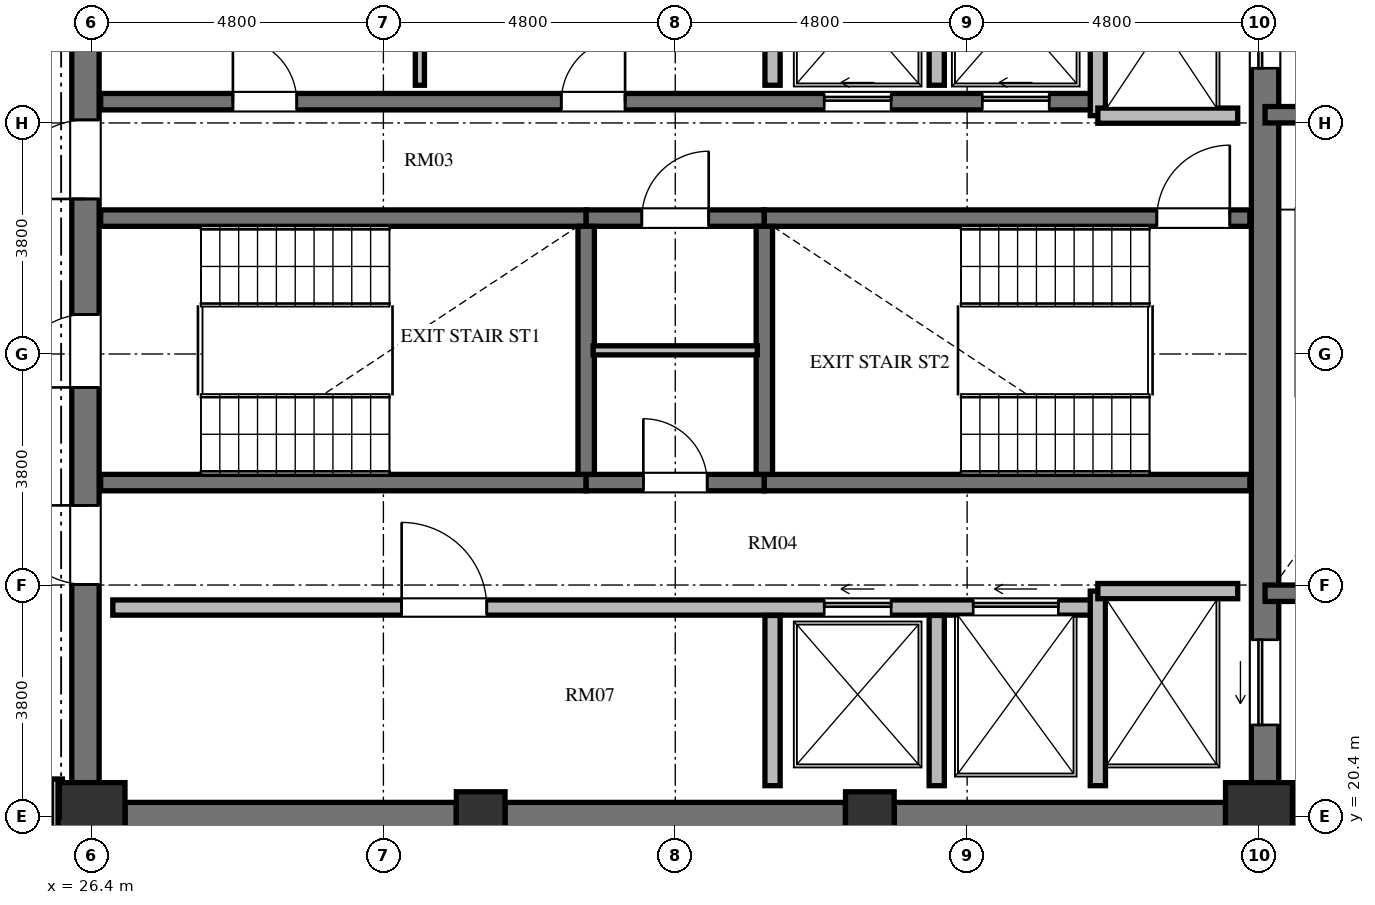
"""IFC4 building model, lengths in metres.
Left out: names, types, materials, properties, quantities, classifications, styles, units other than length and angle.
Written with IfcOpenShell. Run it as: python <this file> out.ifc"""

import sys

from ifc_helpers import new_model, si_unit, direction, frame, frame_2d, origin, origin_2d, place, context, subcontext, project, spatial, rectangle, extrude, element, fill, save


model = new_model("IFC4")
c1 = context("Model", 3, precision=1e-05, world=origin(), true_north=direction((0.0, 1.0)))
c2 = subcontext(c1, "Body", "Model", "MODEL_VIEW")
j1 = project(units=[si_unit("LENGTHUNIT", "METRE"), si_unit("PLANEANGLEUNIT", "RADIAN")], contexts=[c1])
p1 = place(None, origin())
s1 = spatial("IfcSite", under=j1, at=p1, CompositionType="ELEMENT")
p2 = place(p1, origin())
s2 = spatial("IfcBuilding", under=s1, at=p2, CompositionType="ELEMENT")
p3 = place(p2, frame((0.0, 0.0, 251.376)))
s3 = spatial("IfcBuildingStorey", under=s2, at=p3, CompositionType="ELEMENT", Elevation=251.376)
p4 = place(p3, frame((26.4, 20.4, 0.0), z_axis=(0.0, 0.0, 1.0), x_axis=(1.0, 0.0, 0.0)))
e1 = element("IfcColumn", 1, at=p4, inside=s3, PredefinedType="COLUMN", context=c2, shape_type="SweptSolid", body=[
    extrude(rectangle(XDim=1.1, YDim=1.1, at=origin_2d()), origin(), (0.0, 0.0, 1.0), 3.648),
])
for number, where, z_axis, x_axis in (
    (2, (32.8, 20.4, 0.0), (0.0, 0.0, 1.0), (1.0, 0.0, 0.0)),
    (3, (39.2, 20.4, 0.0), (0.0, 0.0, 1.0), (1.0, 0.0, 0.0)),
):
    element("IfcColumn", number, at=place(p3, frame(where, z_axis=z_axis, x_axis=x_axis)), inside=s3, PredefinedType="COLUMN", context=c2, shape_type="SweptSolid", body=[
        extrude(rectangle(XDim=0.8, YDim=0.8, at=origin_2d()), origin(), (0.0, 0.0, 1.0), 3.648),
    ])
p5 = place(p3, frame((45.6, 20.4, 0.0), z_axis=(0.0, 0.0, 1.0), x_axis=(1.0, 0.0, 0.0)))
e4 = element("IfcColumn", 4, at=p5, inside=s3, PredefinedType="COLUMN", context=c2, shape_type="SweptSolid", body=[
    extrude(rectangle(XDim=1.1, YDim=1.1, at=origin_2d()), origin(), (0.0, 0.0, 1.0), 3.648),
])
p6 = place(p3, frame((26.3, 20.95, 0.0), z_axis=(0.0, 0.0, 1.0), x_axis=(0.0, 1.0, 0.0)))
e5 = element("IfcWall", 5, at=p6, inside=s3, PredefinedType="SHEAR", context=c2, shape_type="SweptSolid", body=[
    extrude(rectangle(XDim=14.1, YDim=0.45, at=frame_2d((7.05, 0.0))), origin(), (0.0, 0.0, 1.0), 3.648),
])
p7 = place(p6, frame((6.5, 0.0, 0.0)))
e6 = element("IfcOpeningElement", 6, at=p7, cuts=e5, PredefinedType="OPENING", context=c2, shape_type="SweptSolid", body=[
    extrude(rectangle(XDim=1.2, YDim=2.15, at=frame_2d((0.6, 1.075))), frame((0.0, 0.235, 0.0), z_axis=(0.0, -1.0, 0.0), x_axis=(1.0, 0.0, 0.0)), (0.0, 0.0, 1.0), 0.47),
])
p8 = place(p6, frame((9.6, 0.0, 0.0)))
e7 = element("IfcOpeningElement", 7, at=p8, cuts=e5, PredefinedType="OPENING", context=c2, shape_type="SweptSolid", body=[
    extrude(rectangle(XDim=1.3, YDim=2.2, at=frame_2d((0.65, 1.1))), frame((0.0, 0.235, 0.0), z_axis=(0.0, -1.0, 0.0), x_axis=(1.0, 0.0, 0.0)), (0.0, 0.0, 1.0), 0.47),
])
p9 = place(p6, frame((3.26, 0.0, 0.0)))
e8 = element("IfcOpeningElement", 8, at=p9, cuts=e5, PredefinedType="OPENING", context=c2, shape_type="SweptSolid", body=[
    extrude(rectangle(XDim=1.3, YDim=2.2, at=frame_2d((0.65, 1.1))), frame((0.0, 0.235, 0.0), z_axis=(0.0, -1.0, 0.0), x_axis=(1.0, 0.0, 0.0)), (0.0, 0.0, 1.0), 0.47),
])
p10 = place(p3, frame((45.7, 20.95, 0.0), z_axis=(0.0, 0.0, 1.0), x_axis=(0.0, 1.0, 0.0)))
e9 = element("IfcWall", 9, at=p10, inside=s3, PredefinedType="SHEAR", context=c2, shape_type="SweptSolid", body=[
    extrude(rectangle(XDim=14.1, YDim=0.45, at=frame_2d((7.05, 0.0))), origin(), (0.0, 0.0, 1.0), 3.648),
])
p11 = place(p10, frame((11.75, 0.0, 0.0)))
e10 = element("IfcOpeningElement", 10, at=p11, cuts=e9, PredefinedType="OPENING", context=c2, shape_type="SweptSolid", body=[
    extrude(rectangle(XDim=1.4, YDim=2.3, at=frame_2d((0.7, 1.15))), frame((0.0, 0.235, 0.0), z_axis=(0.0, -1.0, 0.0), x_axis=(1.0, 0.0, 0.0)), (0.0, 0.0, 1.0), 0.47),
])
p12 = place(p10, frame((0.95, 0.0, 0.0)))
e11 = element("IfcOpeningElement", 11, at=p12, cuts=e9, PredefinedType="OPENING", context=c2, shape_type="SweptSolid", body=[
    extrude(rectangle(XDim=1.4, YDim=2.3, at=frame_2d((0.7, 1.15))), frame((0.0, 0.235, 0.0), z_axis=(0.0, -1.0, 0.0), x_axis=(1.0, 0.0, 0.0)), (0.0, 0.0, 1.0), 0.47),
])
p13 = place(p3, frame((26.95, 20.4, 0.0), z_axis=(0.0, 0.0, 1.0), x_axis=(1.0, 0.0, 0.0)))
e12 = element("IfcWall", 12, at=p13, inside=s3, PredefinedType="SHEAR", context=c2, shape_type="SweptSolid", body=[
    extrude(rectangle(XDim=5.45, YDim=0.45, at=frame_2d((2.725, 0.0))), origin(), (0.0, 0.0, 1.0), 3.648),
])
p14 = place(p3, frame((33.2, 20.4, 0.0), z_axis=(0.0, 0.0, 1.0), x_axis=(1.0, 0.0, 0.0)))
e13 = element("IfcWall", 13, at=p14, inside=s3, PredefinedType="SHEAR", context=c2, shape_type="SweptSolid", body=[
    extrude(rectangle(XDim=5.6, YDim=0.45, at=frame_2d((2.8, 0.0))), origin(), (0.0, 0.0, 1.0), 3.648),
])
p15 = place(p3, frame((39.6, 20.4, 0.0), z_axis=(0.0, 0.0, 1.0), x_axis=(1.0, 0.0, 0.0)))
e14 = element("IfcWall", 14, at=p15, inside=s3, PredefinedType="SHEAR", context=c2, shape_type="SweptSolid", body=[
    extrude(rectangle(XDim=5.45, YDim=0.45, at=frame_2d((2.725, 0.0))), origin(), (0.0, 0.0, 1.0), 3.648),
])
p16 = place(p3, frame((26.55, 30.235, 0.0), z_axis=(0.0, 0.0, 1.0), x_axis=(1.0, 0.0, 0.0)))
e15 = element("IfcWall", 15, at=p16, inside=s3, PredefinedType="SHEAR", context=c2, shape_type="SweptSolid", body=[
    extrude(rectangle(XDim=7.985, YDim=0.27, at=frame_2d((3.992, 0.0))), origin(), (0.0, 0.0, 1.0), 3.648),
])
p17 = place(p3, frame((34.535, 30.235, 0.0), z_axis=(0.0, 0.0, 1.0), x_axis=(1.0, 0.0, 0.0)))
e16 = element("IfcWall", 16, at=p17, inside=s3, PredefinedType="SHEAR", context=c2, shape_type="SweptSolid", body=[
    extrude(rectangle(XDim=2.93, YDim=0.27, at=frame_2d((1.465, 0.0))), origin(), (0.0, 0.0, 1.0), 3.648),
])
p18 = place(p17, frame((0.915, 0.0, 0.0)))
e17 = element("IfcOpeningElement", 17, at=p18, cuts=e16, PredefinedType="OPENING", context=c2, shape_type="SweptSolid", body=[
    extrude(rectangle(XDim=1.1, YDim=2.15, at=frame_2d((0.55, 1.075))), frame((0.0, 0.145, 0.0), z_axis=(0.0, -1.0, 0.0), x_axis=(1.0, 0.0, 0.0)), (0.0, 0.0, 1.0), 0.29),
])
p19 = place(p3, frame((37.465, 30.235, 0.0), z_axis=(0.0, 0.0, 1.0), x_axis=(1.0, 0.0, 0.0)))
e18 = element("IfcWall", 18, at=p19, inside=s3, PredefinedType="SHEAR", context=c2, shape_type="SweptSolid", body=[
    extrude(rectangle(XDim=7.985, YDim=0.27, at=frame_2d((3.992, 0.0))), origin(), (0.0, 0.0, 1.0), 3.648),
])
p20 = place(p19, frame((6.455, 0.0, 0.0)))
e19 = element("IfcOpeningElement", 19, at=p20, cuts=e18, PredefinedType="OPENING", context=c2, shape_type="SweptSolid", body=[
    extrude(rectangle(XDim=1.2, YDim=2.15, at=frame_2d((0.6, 1.075))), frame((0.0, 0.145, 0.0), z_axis=(0.0, -1.0, 0.0), x_axis=(1.0, 0.0, 0.0)), (0.0, 0.0, 1.0), 0.29),
])
p21 = place(p3, frame((26.55, 25.885, 0.0), z_axis=(0.0, 0.0, 1.0), x_axis=(1.0, 0.0, 0.0)))
e20 = element("IfcWall", 20, at=p21, inside=s3, PredefinedType="SHEAR", context=c2, shape_type="SweptSolid", body=[
    extrude(rectangle(XDim=7.985, YDim=0.27, at=frame_2d((3.992, 0.0))), origin(), (0.0, 0.0, 1.0), 3.648),
])
p22 = place(p3, frame((34.535, 25.885, 0.0), z_axis=(0.0, 0.0, 1.0), x_axis=(1.0, 0.0, 0.0)))
e21 = element("IfcWall", 21, at=p22, inside=s3, PredefinedType="SHEAR", context=c2, shape_type="SweptSolid", body=[
    extrude(rectangle(XDim=2.93, YDim=0.27, at=frame_2d((1.465, 0.0))), origin(), (0.0, 0.0, 1.0), 3.648),
])
p23 = place(p22, frame((0.94, 0.0, 0.0)))
e22 = element("IfcOpeningElement", 22, at=p23, cuts=e21, PredefinedType="OPENING", context=c2, shape_type="SweptSolid", body=[
    extrude(rectangle(XDim=1.05, YDim=2.15, at=frame_2d((0.525, 1.075))), frame((0.0, 0.145, 0.0), z_axis=(0.0, -1.0, 0.0), x_axis=(1.0, 0.0, 0.0)), (0.0, 0.0, 1.0), 0.29),
])
p24 = place(p3, frame((37.465, 25.885, 0.0), z_axis=(0.0, 0.0, 1.0), x_axis=(1.0, 0.0, 0.0)))
e23 = element("IfcWall", 23, at=p24, inside=s3, PredefinedType="SHEAR", context=c2, shape_type="SweptSolid", body=[
    extrude(rectangle(XDim=7.985, YDim=0.27, at=frame_2d((3.992, 0.0))), origin(), (0.0, 0.0, 1.0), 3.648),
])
for number, where, z_axis, x_axis in (
    (24, (34.535, 26.02, 0.0), (0.0, 0.0, 1.0), (0.0, 1.0, 0.0)),
    (25, (37.465, 26.02, 0.0), (0.0, 0.0, 1.0), (0.0, 1.0, 0.0)),
):
    element("IfcWall", number, at=place(p3, frame(where, z_axis=z_axis, x_axis=x_axis)), inside=s3, PredefinedType="SHEAR", context=c2, shape_type="SweptSolid", body=[
        extrude(rectangle(XDim=4.08, YDim=0.27, at=frame_2d((2.04, 0.0))), origin(), (0.0, 0.0, 1.0), 3.648),
    ])
p25 = place(p3, frame((34.65, 28.06, 0.0), z_axis=(0.0, 0.0, 1.0), x_axis=(1.0, 0.0, 0.0)))
e26 = element("IfcWall", 26, at=p25, inside=s3, PredefinedType="PARTITIONING", context=c2, shape_type="SweptSolid", body=[
    extrude(rectangle(XDim=2.7, YDim=0.15, at=frame_2d((1.35, 0.0))), origin(), (0.0, 0.0, 1.0), 3.448),
])
p26 = place(p3, frame((26.55, 32.15, 0.0), z_axis=(0.0, 0.0, 1.0), x_axis=(1.0, 0.0, 0.0)))
e27 = element("IfcWall", 27, at=p26, inside=s3, PredefinedType="SHEAR", context=c2, shape_type="SweptSolid", body=[
    extrude(rectangle(XDim=16.4, YDim=0.27, at=frame_2d((8.2, 0.0))), origin(), (0.0, 0.0, 1.0), 3.648),
])
p27 = place(p26, frame((2.175, 0.0, 0.0)))
e28 = element("IfcOpeningElement", 28, at=p27, cuts=e27, PredefinedType="OPENING", context=c2, shape_type="SweptSolid", body=[
    extrude(rectangle(XDim=1.05, YDim=2.15, at=frame_2d((0.525, 1.075))), frame((0.0, 0.145, 0.0), z_axis=(0.0, -1.0, 0.0), x_axis=(1.0, 0.0, 0.0)), (0.0, 0.0, 1.0), 0.29),
])
p28 = place(p26, frame((7.575, 0.0, 0.0)))
e29 = element("IfcOpeningElement", 29, at=p28, cuts=e27, PredefinedType="OPENING", context=c2, shape_type="SweptSolid", body=[
    extrude(rectangle(XDim=1.05, YDim=2.15, at=frame_2d((0.525, 1.075))), frame((0.0, 0.145, 0.0), z_axis=(0.0, -1.0, 0.0), x_axis=(1.0, 0.0, 0.0)), (0.0, 0.0, 1.0), 0.29),
])
p29 = place(p26, frame((11.9, 0.0, 0.0)))
e30 = element("IfcOpeningElement", 30, at=p29, cuts=e27, PredefinedType="OPENING", context=c2, shape_type="SweptSolid", body=[
    extrude(rectangle(XDim=1.1, YDim=2.2, at=frame_2d((0.55, 1.1))), frame((0.0, 0.145, 0.0), z_axis=(0.0, -1.0, 0.0), x_axis=(1.0, 0.0, 0.0)), (0.0, 0.0, 1.0), 0.29),
])
p30 = place(p26, frame((14.5, 0.0, 0.0)))
e31 = element("IfcOpeningElement", 31, at=p30, cuts=e27, PredefinedType="OPENING", context=c2, shape_type="SweptSolid", body=[
    extrude(rectangle(XDim=1.1, YDim=2.2, at=frame_2d((0.55, 1.1))), frame((0.0, 0.145, 0.0), z_axis=(0.0, -1.0, 0.0), x_axis=(1.0, 0.0, 0.0)), (0.0, 0.0, 1.0), 0.29),
])
p31 = place(p3, frame((26.75, 23.83, 0.0), z_axis=(0.0, 0.0, 1.0), x_axis=(1.0, 0.0, 0.0)))
e32 = element("IfcWall", 32, at=p31, inside=s3, PredefinedType="SOLIDWALL", context=c2, shape_type="SweptSolid", body=[
    extrude(rectangle(XDim=16.2, YDim=0.25, at=frame_2d((8.1, 0.0))), origin(), (0.0, 0.0, 1.0), 3.448),
])
p32 = place(p31, frame((4.75, 0.0, 0.0)))
e33 = element("IfcOpeningElement", 33, at=p32, cuts=e32, PredefinedType="OPENING", context=c2, shape_type="SweptSolid", body=[
    extrude(rectangle(XDim=1.4, YDim=2.2, at=frame_2d((0.7, 1.1))), frame((0.0, 0.135, 0.0), z_axis=(0.0, -1.0, 0.0), x_axis=(1.0, 0.0, 0.0)), (0.0, 0.0, 1.0), 0.27),
])
p33 = place(p31, frame((11.7, 0.0, 0.0)))
e34 = element("IfcOpeningElement", 34, at=p33, cuts=e32, PredefinedType="OPENING", context=c2, shape_type="SweptSolid", body=[
    extrude(rectangle(XDim=1.1, YDim=2.2, at=frame_2d((0.55, 1.1))), frame((0.0, 0.135, 0.0), z_axis=(0.0, -1.0, 0.0), x_axis=(1.0, 0.0, 0.0)), (0.0, 0.0, 1.0), 0.27),
])
p34 = place(p31, frame((14.15, 0.0, 0.0)))
e35 = element("IfcOpeningElement", 35, at=p34, cuts=e32, PredefinedType="OPENING", context=c2, shape_type="SweptSolid", body=[
    extrude(rectangle(XDim=1.4, YDim=2.3, at=frame_2d((0.7, 1.15))), frame((0.0, 0.135, 0.0), z_axis=(0.0, -1.0, 0.0), x_axis=(1.0, 0.0, 0.0)), (0.0, 0.0, 1.0), 0.27),
])
p35 = place(p3, frame((42.95, 31.92, 0.0), z_axis=(0.0, 0.0, 1.0), x_axis=(0.0, 1.0, 0.0)))
e36 = element("IfcWall", 36, at=p35, inside=s3, PredefinedType="SOLIDWALL", context=c2, shape_type="SweptSolid", body=[
    extrude(rectangle(XDim=3.18, YDim=0.25, at=frame_2d((1.59, 0.0))), origin(), (0.0, 0.0, 1.0), 3.448),
])
p36 = place(p3, frame((42.95, 31.92, 0.0), z_axis=(0.0, 0.0, 1.0), x_axis=(1.0, 0.0, 0.0)))
e37 = element("IfcWall", 37, at=p36, inside=s3, PredefinedType="SOLIDWALL", context=c2, shape_type="SweptSolid", body=[
    extrude(rectangle(XDim=2.3, YDim=0.25, at=frame_2d((1.15, 0.0))), origin(), (0.0, 0.0, 1.0), 3.448),
])
p37 = place(p3, frame((42.95, 20.9, 0.0), z_axis=(0.0, 0.0, 1.0), x_axis=(0.0, 1.0, 0.0)))
e38 = element("IfcWall", 38, at=p37, inside=s3, PredefinedType="SOLIDWALL", context=c2, shape_type="SweptSolid", body=[
    extrude(rectangle(XDim=3.2, YDim=0.25, at=frame_2d((1.6, 0.0))), origin(), (0.0, 0.0, 1.0), 3.448),
])
p38 = place(p3, frame((42.95, 24.1, 0.0), z_axis=(0.0, 0.0, 1.0), x_axis=(1.0, 0.0, 0.0)))
e39 = element("IfcWall", 39, at=p38, inside=s3, PredefinedType="SOLIDWALL", context=c2, shape_type="SweptSolid", body=[
    extrude(rectangle(XDim=2.3, YDim=0.25, at=frame_2d((1.15, 0.0))), origin(), (0.0, 0.0, 1.0), 3.448),
])
p39 = place(p3, frame((37.6, 32.42, 0.0), z_axis=(0.0, 0.0, 1.0), x_axis=(0.0, 1.0, 0.0)))
e40 = element("IfcWall", 40, at=p39, inside=s3, PredefinedType="SOLIDWALL", context=c2, shape_type="SweptSolid", body=[
    extrude(rectangle(XDim=2.68, YDim=0.25, at=frame_2d((1.34, 0.0))), origin(), (0.0, 0.0, 1.0), 3.448),
])
p40 = place(p3, frame((37.6, 20.9, 0.0), z_axis=(0.0, 0.0, 1.0), x_axis=(0.0, 1.0, 0.0)))
e41 = element("IfcWall", 41, at=p40, inside=s3, PredefinedType="SOLIDWALL", context=c2, shape_type="SweptSolid", body=[
    extrude(rectangle(XDim=2.8, YDim=0.25, at=frame_2d((1.4, 0.0))), origin(), (0.0, 0.0, 1.0), 3.448),
])
p41 = place(p3, frame((40.3, 32.42, 0.0), z_axis=(0.0, 0.0, 1.0), x_axis=(0.0, 1.0, 0.0)))
e42 = element("IfcWall", 42, at=p41, inside=s3, PredefinedType="SOLIDWALL", context=c2, shape_type="SweptSolid", body=[
    extrude(rectangle(XDim=2.68, YDim=0.25, at=frame_2d((1.34, 0.0))), origin(), (0.0, 0.0, 1.0), 3.448),
])
p42 = place(p3, frame((40.3, 20.9, 0.0), z_axis=(0.0, 0.0, 1.0), x_axis=(0.0, 1.0, 0.0)))
e43 = element("IfcWall", 43, at=p42, inside=s3, PredefinedType="SOLIDWALL", context=c2, shape_type="SweptSolid", body=[
    extrude(rectangle(XDim=2.8, YDim=0.25, at=frame_2d((1.4, 0.0))), origin(), (0.0, 0.0, 1.0), 3.448),
])
p43 = place(p3, frame((31.8, 32.42, 0.0), z_axis=(0.0, 0.0, 1.0), x_axis=(0.0, 1.0, 0.0)))
e44 = element("IfcWall", 44, at=p43, inside=s3, PredefinedType="PARTITIONING", context=c2, shape_type="SweptSolid", body=[
    extrude(rectangle(XDim=2.68, YDim=0.15, at=frame_2d((1.34, 0.0))), origin(), (0.0, 0.0, 1.0), 3.448),
])
for number, where, z_axis, x_axis in (
    (45, (45.7, 31.935, 0.0), (0.0, 0.0, 1.0), (1.0, 0.0, 0.0)),
    (46, (45.7, 24.065, 0.0), (0.0, 0.0, 1.0), (1.0, 0.0, 0.0)),
):
    element("IfcWall", number, at=place(p3, frame(where, z_axis=z_axis, x_axis=x_axis)), inside=s3, PredefinedType="SHEAR", context=c2, shape_type="SweptSolid", body=[
        extrude(rectangle(XDim=4.715, YDim=0.27, at=frame_2d((2.357, 0.0))), origin(), (0.0, 0.0, 1.0), 3.648),
    ])
p44 = place(p3, frame((25.83, 21.01, 0.0), z_axis=(0.0, 0.0, 1.0), x_axis=(0.0, -1.0, 0.0)))
e47 = element("IfcWall", 47, at=p44, inside=s3, PredefinedType="PARTITIONING", context=c2, shape_type="SweptSolid", body=[
    extrude(rectangle(XDim=1.03, YDim=0.18, at=frame_2d((0.515, 0.0))), origin(), (0.0, 0.0, 1.0), 3.448),
])
p45 = place(p7, origin())
e48 = element("IfcDoor", 48, at=p45, inside=s3, OperationType="SINGLE_SWING_LEFT", PredefinedType="DOOR", context=c2, shape_type="SweptSolid", body=[
    extrude(rectangle(XDim=1.2, YDim=2.15, at=frame_2d((0.6, 1.075))), frame((0.0, 0.025, 0.0), z_axis=(0.0, -1.0, 0.0), x_axis=(1.0, 0.0, 0.0)), (0.0, 0.0, 1.0), 0.05),
])
fill(e6, e48)
p46 = place(p20, origin())
e49 = element("IfcDoor", 49, at=p46, inside=s3, OperationType="SINGLE_SWING_RIGHT", PredefinedType="DOOR", context=c2, shape_type="SweptSolid", body=[
    extrude(rectangle(XDim=1.2, YDim=2.15, at=frame_2d((0.6, 1.075))), frame((0.0, 0.025, 0.0), z_axis=(0.0, -1.0, 0.0), x_axis=(1.0, 0.0, 0.0)), (0.0, 0.0, 1.0), 0.05),
])
fill(e19, e49)
p47 = place(p23, origin())
e50 = element("IfcDoor", 50, at=p47, inside=s3, OperationType="SINGLE_SWING_LEFT", PredefinedType="DOOR", context=c2, shape_type="SweptSolid", body=[
    extrude(rectangle(XDim=1.05, YDim=2.15, at=frame_2d((0.525, 1.075))), frame((0.0, 0.025, 0.0), z_axis=(0.0, -1.0, 0.0), x_axis=(1.0, 0.0, 0.0)), (0.0, 0.0, 1.0), 0.05),
])
fill(e22, e50)
p48 = place(p18, origin())
e51 = element("IfcDoor", 51, at=p48, inside=s3, OperationType="SINGLE_SWING_RIGHT", PredefinedType="DOOR", context=c2, shape_type="SweptSolid", body=[
    extrude(rectangle(XDim=1.1, YDim=2.15, at=frame_2d((0.55, 1.075))), frame((0.0, 0.025, 0.0), z_axis=(0.0, -1.0, 0.0), x_axis=(1.0, 0.0, 0.0)), (0.0, 0.0, 1.0), 0.05),
])
fill(e17, e51)
p49 = place(p8, origin())
e52 = element("IfcDoor", 52, at=p49, inside=s3, OperationType="SINGLE_SWING_LEFT", PredefinedType="DOOR", context=c2, shape_type="SweptSolid", body=[
    extrude(rectangle(XDim=1.3, YDim=2.2, at=frame_2d((0.65, 1.1))), frame((0.0, 0.025, 0.0), z_axis=(0.0, -1.0, 0.0), x_axis=(1.0, 0.0, 0.0)), (0.0, 0.0, 1.0), 0.05),
])
fill(e7, e52)
p50 = place(p9, origin())
e53 = element("IfcDoor", 53, at=p50, inside=s3, OperationType="SINGLE_SWING_RIGHT", PredefinedType="DOOR", context=c2, shape_type="SweptSolid", body=[
    extrude(rectangle(XDim=1.3, YDim=2.2, at=frame_2d((0.65, 1.1))), frame((0.0, 0.025, 0.0), z_axis=(0.0, -1.0, 0.0), x_axis=(1.0, 0.0, 0.0)), (0.0, 0.0, 1.0), 0.05),
])
fill(e8, e53)
p51 = place(p27, origin())
e54 = element("IfcDoor", 54, at=p51, inside=s3, OperationType="SINGLE_SWING_LEFT", PredefinedType="DOOR", context=c2, shape_type="SweptSolid", body=[
    extrude(rectangle(XDim=1.05, YDim=2.15, at=frame_2d((0.525, 1.075))), frame((0.0, 0.025, 0.0), z_axis=(0.0, -1.0, 0.0), x_axis=(1.0, 0.0, 0.0)), (0.0, 0.0, 1.0), 0.05),
])
fill(e28, e54)
p52 = place(p28, origin())
e55 = element("IfcDoor", 55, at=p52, inside=s3, OperationType="SINGLE_SWING_RIGHT", PredefinedType="DOOR", context=c2, shape_type="SweptSolid", body=[
    extrude(rectangle(XDim=1.05, YDim=2.15, at=frame_2d((0.525, 1.075))), frame((0.0, 0.025, 0.0), z_axis=(0.0, -1.0, 0.0), x_axis=(1.0, 0.0, 0.0)), (0.0, 0.0, 1.0), 0.05),
])
fill(e29, e55)
p53 = place(p32, origin())
e56 = element("IfcDoor", 56, at=p53, inside=s3, OperationType="SINGLE_SWING_LEFT", PredefinedType="DOOR", context=c2, shape_type="SweptSolid", body=[
    extrude(rectangle(XDim=1.4, YDim=2.2, at=frame_2d((0.7, 1.1))), frame((0.0, 0.025, 0.0), z_axis=(0.0, -1.0, 0.0), x_axis=(1.0, 0.0, 0.0)), (0.0, 0.0, 1.0), 0.05),
])
fill(e33, e56)
p54 = place(p29, origin())
e57 = element("IfcDoor", 57, at=p54, inside=s3, OperationType="SLIDING_TO_LEFT", PredefinedType="DOOR", context=c2, shape_type="SweptSolid", body=[
    extrude(rectangle(XDim=1.1, YDim=2.2, at=frame_2d((0.55, 1.1))), frame((0.0, 0.025, 0.0), z_axis=(0.0, -1.0, 0.0), x_axis=(1.0, 0.0, 0.0)), (0.0, 0.0, 1.0), 0.05),
])
fill(e30, e57)
p55 = place(p30, origin())
e58 = element("IfcDoor", 58, at=p55, inside=s3, OperationType="SLIDING_TO_LEFT", PredefinedType="DOOR", context=c2, shape_type="SweptSolid", body=[
    extrude(rectangle(XDim=1.1, YDim=2.2, at=frame_2d((0.55, 1.1))), frame((0.0, 0.025, 0.0), z_axis=(0.0, -1.0, 0.0), x_axis=(1.0, 0.0, 0.0)), (0.0, 0.0, 1.0), 0.05),
])
fill(e31, e58)
p56 = place(p33, origin())
e59 = element("IfcDoor", 59, at=p56, inside=s3, OperationType="SLIDING_TO_LEFT", PredefinedType="DOOR", context=c2, shape_type="SweptSolid", body=[
    extrude(rectangle(XDim=1.1, YDim=2.2, at=frame_2d((0.55, 1.1))), frame((0.0, 0.025, 0.0), z_axis=(0.0, -1.0, 0.0), x_axis=(1.0, 0.0, 0.0)), (0.0, 0.0, 1.0), 0.05),
])
fill(e34, e59)
p57 = place(p11, origin())
e60 = element("IfcDoor", 60, at=p57, inside=s3, OperationType="SLIDING_TO_LEFT", PredefinedType="DOOR", context=c2, shape_type="SweptSolid", body=[
    extrude(rectangle(XDim=1.4, YDim=2.3, at=frame_2d((0.7, 1.15))), frame((0.0, 0.025, 0.0), z_axis=(0.0, -1.0, 0.0), x_axis=(1.0, 0.0, 0.0)), (0.0, 0.0, 1.0), 0.05),
])
fill(e10, e60)
p58 = place(p12, origin())
e61 = element("IfcDoor", 61, at=p58, inside=s3, OperationType="SLIDING_TO_LEFT", PredefinedType="DOOR", context=c2, shape_type="SweptSolid", body=[
    extrude(rectangle(XDim=1.4, YDim=2.3, at=frame_2d((0.7, 1.15))), frame((0.0, 0.025, 0.0), z_axis=(0.0, -1.0, 0.0), x_axis=(1.0, 0.0, 0.0)), (0.0, 0.0, 1.0), 0.05),
])
fill(e11, e61)
p59 = place(p34, origin())
e62 = element("IfcDoor", 62, at=p59, inside=s3, OperationType="SLIDING_TO_LEFT", PredefinedType="DOOR", context=c2, shape_type="SweptSolid", body=[
    extrude(rectangle(XDim=1.4, YDim=2.3, at=frame_2d((0.7, 1.15))), frame((0.0, 0.025, 0.0), z_axis=(0.0, -1.0, 0.0), x_axis=(1.0, 0.0, 0.0)), (0.0, 0.0, 1.0), 0.05),
])
fill(e35, e62)
save(model, sys.argv[1])
